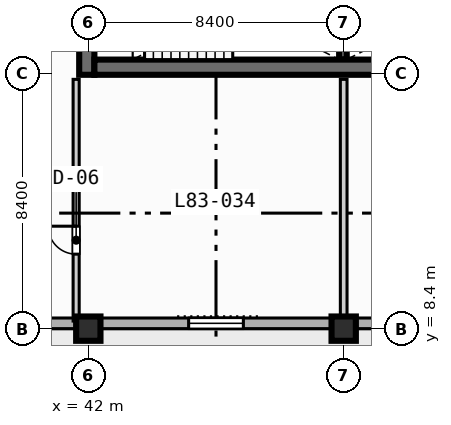
"""IFC4 building model, lengths in metres.
Left out: names, types, materials, properties, quantities, classifications, styles, units other than length and angle.
Written with IfcOpenShell. Run it as: python <this file> out.ifc"""

import sys

from ifc_helpers import new_model, si_unit, direction, frame, frame_2d, origin, origin_2d, place, context, subcontext, project, spatial, rectangle, extrude, element, fill, save


model = new_model("IFC4")
c1 = context("Model", 3, precision=1e-05, world=origin(), true_north=direction((0.0, 1.0)))
c2 = subcontext(c1, "Body", "Model", "MODEL_VIEW")
j1 = project(units=[si_unit("LENGTHUNIT", "METRE"), si_unit("PLANEANGLEUNIT", "RADIAN")], contexts=[c1])
p1 = place(None, origin())
s1 = spatial("IfcSite", under=j1, at=p1, CompositionType="ELEMENT")
p2 = place(p1, origin())
s2 = spatial("IfcBuilding", under=s1, at=p2, CompositionType="ELEMENT")
p3 = place(p2, frame((0.0, 0.0, 335.9)))
s3 = spatial("IfcBuildingStorey", under=s2, at=p3, CompositionType="ELEMENT", Elevation=335.9)
p4 = place(p3, frame((50.375, 17.25, 0.0), z_axis=(0.0, 0.0, 1.0), x_axis=(0.0, 1.0, 0.0)))
e1 = element("IfcWall", 1, at=p4, inside=s3, PredefinedType="SOLIDWALL", context=c2, shape_type="SweptSolid", body=[
    extrude(rectangle(XDim=3.5, YDim=0.25, at=frame_2d((1.75, 0.0))), origin(), (0.0, 0.0, 1.0), 3.67),
])
p5 = place(p3, frame((41.95, 16.75, 0.0), z_axis=(0.0, 0.0, 1.0), x_axis=(0.0, 1.0, 0.0)))
e2 = element("IfcWall", 2, at=p5, inside=s3, PredefinedType="SHEAR", context=c2, shape_type="SweptSolid", body=[
    extrude(rectangle(XDim=1.25, YDim=0.5, at=frame_2d((0.625, 0.0))), origin(), (0.0, 0.0, 1.0), 3.67),
])
p6 = place(p3, frame((42.2, 17.0, 0.0), z_axis=(0.0, 0.0, 1.0), x_axis=(1.0, 0.0, 0.0)))
e3 = element("IfcWall", 3, at=p6, inside=s3, PredefinedType="SHEAR", context=c2, shape_type="SweptSolid", body=[
    extrude(rectangle(XDim=16.35, YDim=0.5, at=frame_2d((8.175, 0.0))), origin(), (0.0, 0.0, 1.0), 3.67),
])
for number, where, z_axis, x_axis in (
    (4, (42.0, 8.4, 0.0), (0.0, 0.0, 1.0), (1.0, 0.0, 0.0)),
    (5, (50.4, 8.4, 0.0), (0.0, 0.0, 1.0), (1.0, 0.0, 0.0)),
):
    element("IfcColumn", number, at=place(p3, frame(where, z_axis=z_axis, x_axis=x_axis)), inside=s3, PredefinedType="COLUMN", context=c2, shape_type="SweptSolid", body=[
        extrude(rectangle(XDim=0.8, YDim=0.8, at=origin_2d()), origin(), (0.0, 0.0, 1.0), 3.9),
    ])
p7 = place(p3, frame((64.025, 8.575, 0.0), z_axis=(0.0, 0.0, 1.0), x_axis=(-1.0, 0.0, 0.0)))
e6 = element("IfcWall", 6, at=p7, inside=s3, PredefinedType="STANDARD", context=c2, shape_type="SweptSolid", body=[
    extrude(rectangle(XDim=52.45, YDim=0.35, at=frame_2d((26.225, 0.0))), origin(), (0.0, 0.0, 1.0), 3.67),
])
p8 = place(p7, frame((33.925, 0.0, 0.0)))
e7 = element("IfcOpeningElement", 7, at=p8, cuts=e6, PredefinedType="OPENING", context=c2, shape_type="SweptSolid", body=[
    extrude(rectangle(XDim=1.4, YDim=2.2, at=frame_2d((0.7, 1.1))), frame((0.0, 0.185, 0.0), z_axis=(0.0, -1.0, 0.0), x_axis=(1.0, 0.0, 0.0)), (0.0, 0.0, 1.0), 0.37),
])
p9 = place(p7, frame((25.025, 0.0, 0.85)))
e8 = element("IfcOpeningElement", 8, at=p9, cuts=e6, PredefinedType="OPENING", context=c2, shape_type="SweptSolid", body=[
    extrude(rectangle(XDim=2.4, YDim=1.95, at=frame_2d((1.2, 0.975))), frame((0.0, 0.185, 0.0), z_axis=(0.0, -1.0, 0.0), x_axis=(1.0, 0.0, 0.0)), (0.0, 0.0, 1.0), 0.37),
])
p10 = place(p7, frame((16.925, 0.0, 0.85)))
e9 = element("IfcOpeningElement", 9, at=p10, cuts=e6, PredefinedType="OPENING", context=c2, shape_type="SweptSolid", body=[
    extrude(rectangle(XDim=1.8, YDim=1.8, at=frame_2d((0.9, 0.9))), frame((0.0, 0.185, 0.0), z_axis=(0.0, -1.0, 0.0), x_axis=(1.0, 0.0, 0.0)), (0.0, 0.0, 1.0), 0.37),
])
p11 = place(p7, frame((41.815, 0.0, 0.85)))
e10 = element("IfcOpeningElement", 10, at=p11, cuts=e6, PredefinedType="OPENING", context=c2, shape_type="SweptSolid", body=[
    extrude(rectangle(XDim=1.8, YDim=1.8, at=frame_2d((0.9, 0.9))), frame((0.0, 0.185, 0.0), z_axis=(0.0, -1.0, 0.0), x_axis=(1.0, 0.0, 0.0)), (0.0, 0.0, 1.0), 0.37),
])
p12 = place(p7, frame((49.535, 0.0, 0.85)))
e11 = element("IfcOpeningElement", 11, at=p12, cuts=e6, PredefinedType="OPENING", context=c2, shape_type="SweptSolid", body=[
    extrude(rectangle(XDim=1.8, YDim=1.8, at=frame_2d((0.9, 0.9))), frame((0.0, 0.185, 0.0), z_axis=(0.0, -1.0, 0.0), x_axis=(1.0, 0.0, 0.0)), (0.0, 0.0, 1.0), 0.37),
])
p13 = place(p3, frame((41.6, 8.65, 0.0), z_axis=(0.0, 0.0, 1.0), x_axis=(0.0, 1.0, 0.0)))
e12 = element("IfcWall", 12, at=p13, inside=s3, PredefinedType="PARTITIONING", context=c2, shape_type="SweptSolid", body=[
    extrude(rectangle(XDim=7.95, YDim=0.2, at=frame_2d((3.975, 0.0))), origin(), (0.0, 0.0, 1.0), 3.67),
])
p14 = place(p13, frame((2.2, 0.0, 0.0)))
e13 = element("IfcOpeningElement", 13, at=p14, cuts=e12, PredefinedType="OPENING", context=c2, shape_type="SweptSolid", body=[
    extrude(rectangle(XDim=0.92, YDim=2.1, at=frame_2d((0.46, 1.05))), frame((0.0, 0.11, 0.0), z_axis=(0.0, -1.0, 0.0), x_axis=(1.0, 0.0, 0.0)), (0.0, 0.0, 1.0), 0.22),
])
p15 = place(p3, frame((50.4, 8.65, 0.0), z_axis=(0.0, 0.0, 1.0), x_axis=(0.0, 1.0, 0.0)))
e14 = element("IfcWall", 14, at=p15, inside=s3, PredefinedType="PARTITIONING", context=c2, shape_type="SweptSolid", body=[
    extrude(rectangle(XDim=7.95, YDim=0.22, at=frame_2d((3.975, 0.0))), origin(), (0.0, 0.0, 1.0), 3.207),
])
p16 = place(p10, origin())
e15 = element("IfcWindow", 15, at=p16, inside=s3, PartitioningType="SINGLE_PANEL", PredefinedType="WINDOW", context=c2, shape_type="SweptSolid", body=[
    extrude(rectangle(XDim=1.8, YDim=1.8, at=frame_2d((0.9, 0.9))), frame((0.0, 0.03, 0.0), z_axis=(0.0, -1.0, 0.0), x_axis=(1.0, 0.0, 0.0)), (0.0, 0.0, 1.0), 0.06),
])
fill(e9, e15)
p17 = place(p14, origin())
e16 = element("IfcDoor", 16, at=p17, inside=s3, OperationType="SINGLE_SWING_RIGHT", PredefinedType="DOOR", context=c2, shape_type="SweptSolid", body=[
    extrude(rectangle(XDim=0.92, YDim=2.1, at=frame_2d((0.46, 1.05))), frame((0.0, 0.025, 0.0), z_axis=(0.0, -1.0, 0.0), x_axis=(1.0, 0.0, 0.0)), (0.0, 0.0, 1.0), 0.05),
])
fill(e13, e16)
save(model, sys.argv[1])
